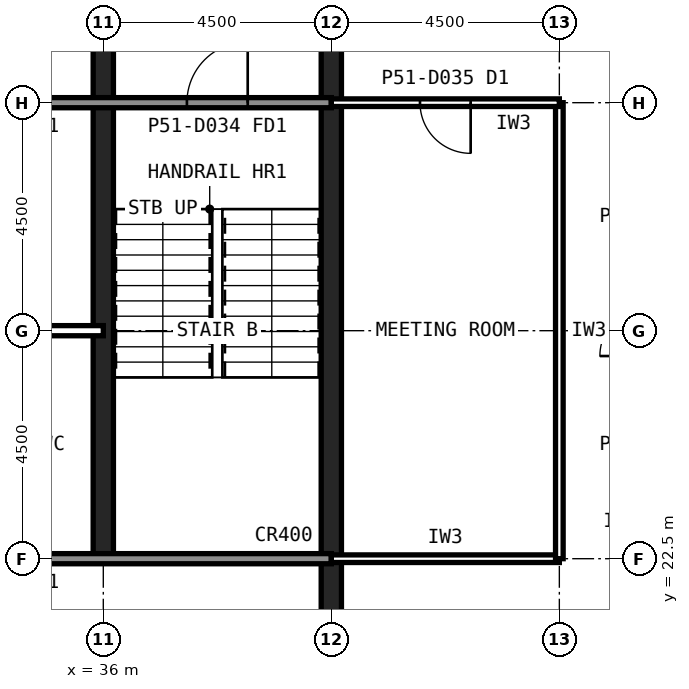
"""IFC4 building model, lengths in metres.
Left out: names, types, materials, properties, quantities, classifications, styles, units other than length and angle.
Written with IfcOpenShell. Run it as: python <this file> out.ifc"""

import sys

from ifc_helpers import new_model, si_unit, direction, frame, frame_2d, origin, place, context, subcontext, project, spatial, rectangle, extrude, element, fill, save


model = new_model("IFC4")
c1 = context("Model", 3, precision=1e-05, world=origin(), true_north=direction((0.0, 1.0)))
c2 = subcontext(c1, "Body", "Model", "MODEL_VIEW")
j1 = project(units=[si_unit("LENGTHUNIT", "METRE"), si_unit("PLANEANGLEUNIT", "RADIAN")], contexts=[c1])
p1 = place(None, origin())
s1 = spatial("IfcSite", under=j1, at=p1, CompositionType="ELEMENT")
p2 = place(p1, origin())
s2 = spatial("IfcBuilding", under=s1, at=p2, CompositionType="ELEMENT")
p3 = place(p2, frame((0.0, 0.0, 214.6)))
s3 = spatial("IfcBuildingStorey", under=s2, at=p3, CompositionType="ELEMENT", Elevation=214.6)
p4 = place(p3, frame((40.5, 13.5, 0.0), z_axis=(0.0, 0.0, 1.0), x_axis=(0.0, 1.0, 0.0)))
e1 = element("IfcWall", 1, at=p4, inside=s3, PredefinedType="SHEAR", context=c2, shape_type="SweptSolid", body=[
    extrude(rectangle(XDim=27.0, YDim=0.4, at=frame_2d((13.5, 0.0))), origin(), (0.0, 0.0, 1.0), 4.0),
])
p5 = place(p4, frame((5.85, 0.0, 0.0)))
e2 = element("IfcOpeningElement", 2, at=p5, cuts=e1, PredefinedType="OPENING", context=c2, shape_type="SweptSolid", body=[
    extrude(rectangle(XDim=1.8, YDim=2.1, at=frame_2d((0.9, 1.05))), frame((0.0, 0.21, 0.0), z_axis=(0.0, -1.0, 0.0), x_axis=(1.0, 0.0, 0.0)), (0.0, 0.0, 1.0), 0.42),
])
p6 = place(p4, frame((19.65, 0.0, 0.0)))
e3 = element("IfcOpeningElement", 3, at=p6, cuts=e1, PredefinedType="OPENING", context=c2, shape_type="SweptSolid", body=[
    extrude(rectangle(XDim=1.2, YDim=2.1, at=frame_2d((0.6, 1.05))), frame((0.0, 0.21, 0.0), z_axis=(0.0, -1.0, 0.0), x_axis=(1.0, 0.0, 0.0)), (0.0, 0.0, 1.0), 0.42),
])
p7 = place(p3, frame((36.0, 22.5, 0.0), z_axis=(0.0, 0.0, 1.0), x_axis=(0.0, 1.0, 0.0)))
e4 = element("IfcWall", 4, at=p7, inside=s3, PredefinedType="SHEAR", context=c2, shape_type="SweptSolid", body=[
    extrude(rectangle(XDim=18.0, YDim=0.4, at=frame_2d((9.0, 0.0))), origin(), (0.0, 0.0, 1.0), 4.0),
])
p8 = place(p3, frame((13.5, 22.5, 0.0), z_axis=(0.0, 0.0, 1.0), x_axis=(1.0, 0.0, 0.0)))
e5 = element("IfcWall", 5, at=p8, inside=s3, PredefinedType="SOLIDWALL", context=c2, shape_type="SweptSolid", body=[
    extrude(rectangle(XDim=27.0, YDim=0.2, at=frame_2d((13.5, 0.0))), origin(), (0.0, 0.0, 1.0), 3.84),
])
p9 = place(p8, frame((1.65, 0.0, 0.0)))
e6 = element("IfcOpeningElement", 6, at=p9, cuts=e5, PredefinedType="OPENING", context=c2, shape_type="SweptSolid", body=[
    extrude(rectangle(XDim=1.2, YDim=2.1, at=frame_2d((0.6, 1.05))), frame((0.0, 0.11, 0.0), z_axis=(0.0, -1.0, 0.0), x_axis=(1.0, 0.0, 0.0)), (0.0, 0.0, 1.0), 0.22),
])
p10 = place(p8, frame((6.025, 0.0, 0.0)))
e7 = element("IfcOpeningElement", 7, at=p10, cuts=e5, PredefinedType="OPENING", context=c2, shape_type="SweptSolid", body=[
    extrude(rectangle(XDim=1.0, YDim=2.1, at=frame_2d((0.5, 1.05))), frame((0.0, 0.11, 0.0), z_axis=(0.0, -1.0, 0.0), x_axis=(1.0, 0.0, 0.0)), (0.0, 0.0, 1.0), 0.22),
])
p11 = place(p8, frame((10.525, 0.0, 0.0)))
e8 = element("IfcOpeningElement", 8, at=p11, cuts=e5, PredefinedType="OPENING", context=c2, shape_type="SweptSolid", body=[
    extrude(rectangle(XDim=1.0, YDim=2.1, at=frame_2d((0.5, 1.05))), frame((0.0, 0.11, 0.0), z_axis=(0.0, -1.0, 0.0), x_axis=(1.0, 0.0, 0.0)), (0.0, 0.0, 1.0), 0.22),
])
p12 = place(p8, frame((19.75, 0.0, 0.0)))
e9 = element("IfcOpeningElement", 9, at=p12, cuts=e5, PredefinedType="OPENING", context=c2, shape_type="SweptSolid", body=[
    extrude(rectangle(XDim=1.0, YDim=2.1, at=frame_2d((0.5, 1.05))), frame((0.0, 0.11, 0.0), z_axis=(0.0, -1.0, 0.0), x_axis=(1.0, 0.0, 0.0)), (0.0, 0.0, 1.0), 0.22),
])
p13 = place(p8, frame((15.05, 0.0, 0.0)))
e10 = element("IfcOpeningElement", 10, at=p13, cuts=e5, PredefinedType="OPENING", context=c2, shape_type="SweptSolid", body=[
    extrude(rectangle(XDim=1.4, YDim=2.4, at=frame_2d((0.7, 1.2))), frame((0.0, 0.11, 0.0), z_axis=(0.0, -1.0, 0.0), x_axis=(1.0, 0.0, 0.0)), (0.0, 0.0, 1.0), 0.22),
])
p14 = place(p3, frame((13.5, 31.5, 0.0), z_axis=(0.0, 0.0, 1.0), x_axis=(1.0, 0.0, 0.0)))
e11 = element("IfcWall", 11, at=p14, inside=s3, PredefinedType="SOLIDWALL", context=c2, shape_type="SweptSolid", body=[
    extrude(rectangle(XDim=27.0, YDim=0.2, at=frame_2d((13.5, 0.0))), origin(), (0.0, 0.0, 1.0), 3.84),
])
p15 = place(p14, frame((24.15, 0.0, 0.0)))
e12 = element("IfcOpeningElement", 12, at=p15, cuts=e11, PredefinedType="OPENING", context=c2, shape_type="SweptSolid", body=[
    extrude(rectangle(XDim=1.2, YDim=2.1, at=frame_2d((0.6, 1.05))), frame((0.0, 0.11, 0.0), z_axis=(0.0, -1.0, 0.0), x_axis=(1.0, 0.0, 0.0)), (0.0, 0.0, 1.0), 0.22),
])
p16 = place(p14, frame((15.3, 0.0, 0.0)))
e13 = element("IfcOpeningElement", 13, at=p16, cuts=e11, PredefinedType="OPENING", context=c2, shape_type="SweptSolid", body=[
    extrude(rectangle(XDim=0.9, YDim=2.1, at=frame_2d((0.45, 1.05))), frame((0.0, 0.11, 0.0), z_axis=(0.0, -1.0, 0.0), x_axis=(1.0, 0.0, 0.0)), (0.0, 0.0, 1.0), 0.22),
])
p17 = place(p14, frame((19.8, 0.0, 0.0)))
e14 = element("IfcOpeningElement", 14, at=p17, cuts=e11, PredefinedType="OPENING", context=c2, shape_type="SweptSolid", body=[
    extrude(rectangle(XDim=0.9, YDim=2.1, at=frame_2d((0.45, 1.05))), frame((0.0, 0.11, 0.0), z_axis=(0.0, -1.0, 0.0), x_axis=(1.0, 0.0, 0.0)), (0.0, 0.0, 1.0), 0.22),
])
p18 = place(p3, frame((27.0, 27.0, 0.0), z_axis=(0.0, 0.0, 1.0), x_axis=(1.0, 0.0, 0.0)))
e15 = element("IfcWall", 15, at=p18, inside=s3, PredefinedType="PARTITIONING", context=c2, shape_type="SweptSolid", body=[
    extrude(rectangle(XDim=9.0, YDim=0.2, at=frame_2d((4.5, 0.0))), origin(), (0.0, 0.0, 1.0), 3.84),
])
p19 = place(p3, frame((40.5, 22.5, 0.0), z_axis=(0.0, 0.0, 1.0), x_axis=(1.0, 0.0, 0.0)))
e16 = element("IfcWall", 16, at=p19, inside=s3, PredefinedType="PARTITIONING", context=c2, shape_type="SweptSolid", body=[
    extrude(rectangle(XDim=4.5, YDim=0.15, at=frame_2d((2.25, 0.0))), origin(), (0.0, 0.0, 1.0), 2.989),
])
p20 = place(p3, frame((45.0, 22.5, 0.0), z_axis=(0.0, 0.0, 1.0), x_axis=(0.0, 1.0, 0.0)))
e17 = element("IfcWall", 17, at=p20, inside=s3, PredefinedType="PARTITIONING", context=c2, shape_type="SweptSolid", body=[
    extrude(rectangle(XDim=9.0, YDim=0.15, at=frame_2d((4.5, 0.0))), origin(), (0.0, 0.0, 1.0), 3.84),
])
p21 = place(p3, frame((45.0, 31.5, 0.0), z_axis=(0.0, 0.0, 1.0), x_axis=(-1.0, 0.0, 0.0)))
e18 = element("IfcWall", 18, at=p21, inside=s3, PredefinedType="PARTITIONING", context=c2, shape_type="SweptSolid", body=[
    extrude(rectangle(XDim=4.5, YDim=0.15, at=frame_2d((2.25, 0.0))), origin(), (0.0, 0.0, 1.0), 2.989),
])
p22 = place(p21, frame((1.75, 0.0, 0.0)))
e19 = element("IfcOpeningElement", 19, at=p22, cuts=e18, PredefinedType="OPENING", context=c2, shape_type="SweptSolid", body=[
    extrude(rectangle(XDim=1.0, YDim=2.1, at=frame_2d((0.5, 1.05))), frame((0.0, 0.085, 0.0), z_axis=(0.0, -1.0, 0.0), x_axis=(1.0, 0.0, 0.0)), (0.0, 0.0, 1.0), 0.17),
])
p23 = place(p15, origin())
e20 = element("IfcDoor", 20, at=p23, inside=s3, OperationType="SINGLE_SWING_RIGHT", PredefinedType="DOOR", context=c2, shape_type="SweptSolid", body=[
    extrude(rectangle(XDim=1.2, YDim=2.1, at=frame_2d((0.6, 1.05))), frame((0.0, 0.025, 0.0), z_axis=(0.0, -1.0, 0.0), x_axis=(1.0, 0.0, 0.0)), (0.0, 0.0, 1.0), 0.05),
])
fill(e12, e20)
p24 = place(p22, origin())
e21 = element("IfcDoor", 21, at=p24, inside=s3, OperationType="SINGLE_SWING_LEFT", PredefinedType="DOOR", context=c2, shape_type="SweptSolid", body=[
    extrude(rectangle(XDim=1.0, YDim=2.1, at=frame_2d((0.5, 1.05))), frame((0.0, 0.025, 0.0), z_axis=(0.0, -1.0, 0.0), x_axis=(1.0, 0.0, 0.0)), (0.0, 0.0, 1.0), 0.05),
])
fill(e19, e21)
save(model, sys.argv[1])
